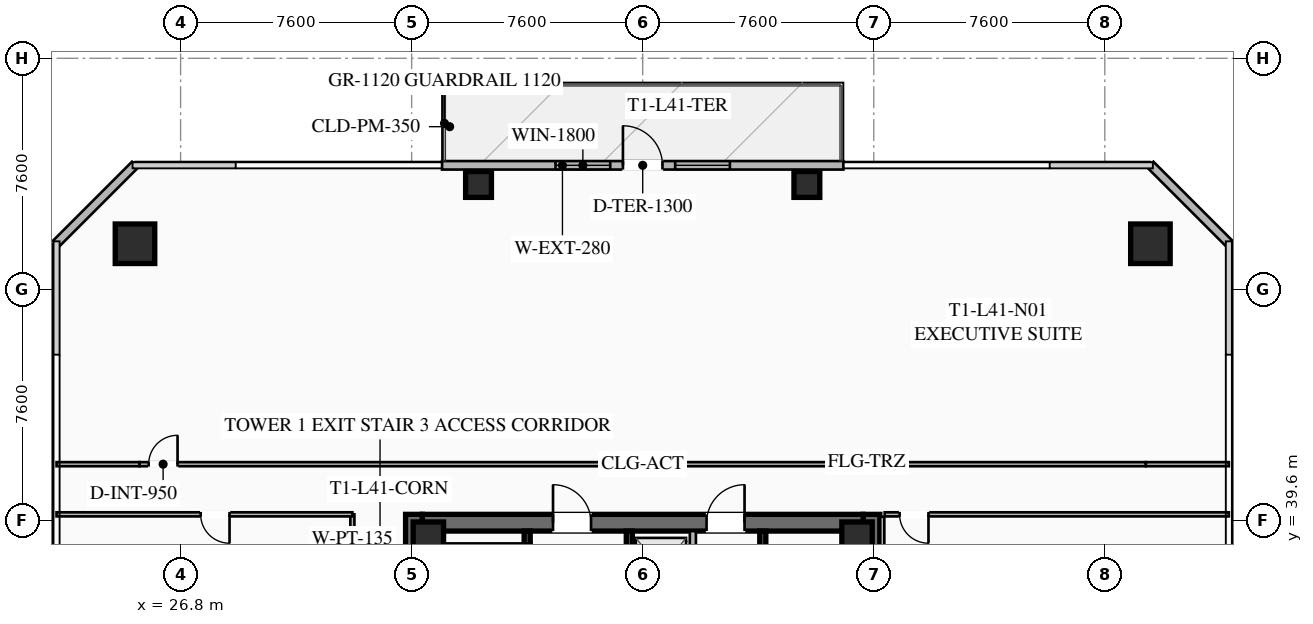
"""IFC4 building model, lengths in metres.
Left out: names, types, materials, properties, quantities, classifications, styles, units other than length and angle.
Written with IfcOpenShell. Run it as: python <this file> out.ifc"""

import sys

from ifc_helpers import new_model, si_unit, direction, frame, frame_2d, origin, origin_2d, place, context, subcontext, project, spatial, rectangle, hollow_rectangle, extrude, element, fill, save


model = new_model("IFC4")
c1 = context("Model", 3, precision=1e-05, world=origin(), true_north=direction((0.0, 1.0)))
c2 = subcontext(c1, "Body", "Model", "MODEL_VIEW")
j1 = project(units=[si_unit("LENGTHUNIT", "METRE"), si_unit("PLANEANGLEUNIT", "RADIAN")], contexts=[c1])
p1 = place(None, origin())
s1 = spatial("IfcSite", under=j1, at=p1, CompositionType="ELEMENT")
p2 = place(p1, origin())
s2 = spatial("IfcBuilding", under=s1, at=p2, CompositionType="ELEMENT")
p3 = place(p2, frame((0.0, 0.0, 153.45)))
s3 = spatial("IfcBuildingStorey", under=s2, at=p3, CompositionType="ELEMENT", Elevation=153.45)
for number, where, z_axis, x_axis in (
    (1, (34.475, 24.2, 0.0), (0.0, 0.0, 1.0), (0.0, 1.0, 0.0)),
    (2, (49.525, 39.8, 0.0), (0.0, 0.0, 1.0), (0.0, -1.0, 0.0)),
):
    element("IfcWall", number, at=place(p3, frame(where, z_axis=z_axis, x_axis=x_axis)), inside=s3, PredefinedType="SHEAR", context=c2, shape_type="SweptSolid", body=[
        extrude(rectangle(XDim=15.6, YDim=0.55, at=frame_2d((7.8, 0.0))), origin(), (0.0, 0.0, 1.0), 3.55),
    ])
p4 = place(p3, frame((34.75, 39.525, 0.0), z_axis=(0.0, 0.0, 1.0), x_axis=(1.0, 0.0, 0.0)))
e3 = element("IfcWall", 3, at=p4, inside=s3, PredefinedType="SHEAR", context=c2, shape_type="SweptSolid", body=[
    extrude(rectangle(XDim=14.5, YDim=0.55, at=frame_2d((7.25, 0.0))), origin(), (0.0, 0.0, 1.0), 3.55),
])
p5 = place(p4, frame((4.3, 0.0, 0.0)))
e4 = element("IfcOpeningElement", 4, at=p5, cuts=e3, PredefinedType="OPENING", context=c2, shape_type="SweptSolid", body=[
    extrude(rectangle(XDim=1.25, YDim=2.25, at=frame_2d((0.625, 1.125))), frame((0.0, 0.285, 0.0), z_axis=(0.0, -1.0, 0.0), x_axis=(1.0, 0.0, 0.0)), (0.0, 0.0, 1.0), 0.57),
])
p6 = place(p4, frame((9.35, 0.0, 0.0)))
e5 = element("IfcOpeningElement", 5, at=p6, cuts=e3, PredefinedType="OPENING", context=c2, shape_type="SweptSolid", body=[
    extrude(rectangle(XDim=1.25, YDim=2.25, at=frame_2d((0.625, 1.125))), frame((0.0, 0.285, 0.0), z_axis=(0.0, -1.0, 0.0), x_axis=(1.0, 0.0, 0.0)), (0.0, 0.0, 1.0), 0.57),
])
for number, where, z_axis, x_axis in (
    (6, (49.05, 39.05, 0.0), (0.0, 0.0, 1.0), (1.0, 0.0, 0.0)),
    (7, (34.95, 39.05, 0.0), (0.0, 0.0, 1.0), (1.0, 0.0, 0.0)),
):
    element("IfcColumn", number, at=place(p3, frame(where, z_axis=z_axis, x_axis=x_axis)), inside=s3, PredefinedType="COLUMN", context=c2, shape_type="SweptSolid", body=[
        extrude(hollow_rectangle(XDim=1.0, YDim=1.0, WallThickness=0.04, at=origin_2d()), origin(), (0.0, 0.0, 1.0), 3.37),
    ])
for number, where, z_axis, x_axis in (
    (8, (58.7, 48.7, 0.0), (0.0, 0.0, 1.0), (1.0, 0.0, 0.0)),
    (9, (25.3, 48.7, 0.0), (0.0, 0.0, 1.0), (1.0, 0.0, 0.0)),
):
    element("IfcColumn", number, at=place(p3, frame(where, z_axis=z_axis, x_axis=x_axis)), inside=s3, PredefinedType="COLUMN", context=c2, shape_type="SweptSolid", body=[
        extrude(hollow_rectangle(XDim=1.3, YDim=1.3, WallThickness=0.05, at=origin_2d()), origin(), (0.0, 0.0, 1.0), 3.37),
    ])
for number, where, z_axis, x_axis in (
    (10, (47.4, 50.65, 0.0), (0.0, 0.0, 1.0), (1.0, 0.0, 0.0)),
    (11, (36.6, 50.65, 0.0), (0.0, 0.0, 1.0), (1.0, 0.0, 0.0)),
):
    element("IfcColumn", number, at=place(p3, frame(where, z_axis=z_axis, x_axis=x_axis)), inside=s3, PredefinedType="COLUMN", context=c2, shape_type="SweptSolid", body=[
        extrude(hollow_rectangle(XDim=0.85, YDim=0.85, WallThickness=0.035, at=origin_2d()), origin(), (0.0, 0.0, 1.0), 3.37),
    ])
p7 = place(p3, frame((35.4, 51.28, 0.0), z_axis=(0.0, 0.0, 1.0), x_axis=(1.0, 0.0, 0.0)))
e12 = element("IfcWall", 12, at=p7, inside=s3, PredefinedType="SOLIDWALL", context=c2, shape_type="SweptSolid", body=[
    extrude(rectangle(XDim=13.2, YDim=0.28, at=frame_2d((6.6, 0.0))), origin(), (0.0, 0.0, 1.0), 3.37),
])
p8 = place(p7, frame((5.95, 0.0, 0.0)))
e13 = element("IfcOpeningElement", 13, at=p8, cuts=e12, PredefinedType="OPENING", context=c2, shape_type="SweptSolid", body=[
    extrude(rectangle(XDim=1.3, YDim=2.15, at=frame_2d((0.65, 1.075))), frame((0.0, 0.15, 0.0), z_axis=(0.0, -1.0, 0.0), x_axis=(1.0, 0.0, 0.0)), (0.0, 0.0, 1.0), 0.3),
])
p9 = place(p7, frame((3.732, 0.0, 0.85)))
e14 = element("IfcOpeningElement", 14, at=p9, cuts=e12, PredefinedType="OPENING", context=c2, shape_type="SweptSolid", body=[
    extrude(rectangle(XDim=1.8, YDim=1.92, at=frame_2d((0.9, 0.96))), frame((0.0, 0.15, 0.0), z_axis=(0.0, -1.0, 0.0), x_axis=(1.0, 0.0, 0.0)), (0.0, 0.0, 1.0), 0.3),
])
p10 = place(p7, frame((7.668, 0.0, 0.85)))
e15 = element("IfcOpeningElement", 15, at=p10, cuts=e12, PredefinedType="OPENING", context=c2, shape_type="SweptSolid", body=[
    extrude(rectangle(XDim=1.8, YDim=1.92, at=frame_2d((0.9, 0.96))), frame((0.0, 0.15, 0.0), z_axis=(0.0, -1.0, 0.0), x_axis=(1.0, 0.0, 0.0)), (0.0, 0.0, 1.0), 0.3),
])
for number, where, z_axis, x_axis in (
    (16, (22.7, 48.7, 0.0), (0.0, 0.0, 1.0), (0.707, 0.707, 0.0)),
    (17, (58.7, 51.3, 0.0), (0.0, 0.0, 1.0), (0.707, -0.707, 0.0)),
):
    element("IfcWall", number, at=place(p3, frame(where, z_axis=z_axis, x_axis=x_axis)), inside=s3, PredefinedType="SOLIDWALL", context=c2, shape_type="SweptSolid", body=[
        extrude(rectangle(XDim=3.677, YDim=0.28, at=frame_2d((1.838, 0.0))), origin(), (0.0, 0.0, 1.0), 3.37),
    ])
p11 = place(p3, frame((38.2, 31.2, 0.0), z_axis=(0.0, 0.0, 1.0), x_axis=(0.0, 1.0, 0.0)))
e18 = element("IfcWall", 18, at=p11, inside=s3, PredefinedType="SHEAR", context=c2, shape_type="SweptSolid", body=[
    extrude(rectangle(XDim=8.05, YDim=0.2, at=frame_2d((4.025, 0.0))), origin(), (0.0, 0.0, 1.0), 3.37),
])
p12 = place(p11, frame((0.45, 0.0, 0.0)))
e19 = element("IfcOpeningElement", 19, at=p12, cuts=e18, PredefinedType="OPENING", context=c2, shape_type="SweptSolid", body=[
    extrude(rectangle(XDim=1.15, YDim=2.2, at=frame_2d((0.575, 1.1))), frame((0.0, 0.11, 0.0), z_axis=(0.0, -1.0, 0.0), x_axis=(1.0, 0.0, 0.0)), (0.0, 0.0, 1.0), 0.22),
])
p13 = place(p3, frame((41.56, 24.75, 0.0), z_axis=(0.0, 0.0, 1.0), x_axis=(0.0, 1.0, 0.0)))
e20 = element("IfcWall", 20, at=p13, inside=s3, PredefinedType="SHEAR", context=c2, shape_type="SweptSolid", body=[
    extrude(rectangle(XDim=14.5, YDim=0.2, at=frame_2d((7.25, 0.0))), origin(), (0.0, 0.0, 1.0), 3.37),
])
p14 = place(p3, frame((45.95, 39.25, 0.0), z_axis=(0.0, 0.0, 1.0), x_axis=(0.0, -1.0, 0.0)))
e21 = element("IfcWall", 21, at=p14, inside=s3, PredefinedType="SHEAR", context=c2, shape_type="SweptSolid", body=[
    extrude(rectangle(XDim=6.45, YDim=0.2, at=frame_2d((3.225, 0.0))), origin(), (0.0, 0.0, 1.0), 3.37),
])
p15 = place(p3, frame((43.65, 32.35, 0.0), z_axis=(0.0, 0.0, 1.0), x_axis=(0.0, 1.0, 0.0)))
e22 = element("IfcWall", 22, at=p15, inside=s3, PredefinedType="SOLIDWALL", context=c2, shape_type="SweptSolid", body=[
    extrude(rectangle(XDim=6.9, YDim=0.2, at=frame_2d((3.45, 0.0))), origin(), (0.0, 0.0, 1.0), 3.37),
])
p16 = place(p15, frame((0.575, 0.0, 0.0)))
e23 = element("IfcOpeningElement", 23, at=p16, cuts=e22, PredefinedType="OPENING", context=c2, shape_type="SweptSolid", body=[
    extrude(rectangle(XDim=1.1, YDim=2.2, at=frame_2d((0.55, 1.1))), frame((0.0, 0.11, 0.0), z_axis=(0.0, -1.0, 0.0), x_axis=(1.0, 0.0, 0.0)), (0.0, 0.0, 1.0), 0.22),
])
p17 = place(p15, frame((2.825, 0.0, 0.0)))
e24 = element("IfcOpeningElement", 24, at=p17, cuts=e22, PredefinedType="OPENING", context=c2, shape_type="SweptSolid", body=[
    extrude(rectangle(XDim=1.1, YDim=2.2, at=frame_2d((0.55, 1.1))), frame((0.0, 0.11, 0.0), z_axis=(0.0, -1.0, 0.0), x_axis=(1.0, 0.0, 0.0)), (0.0, 0.0, 1.0), 0.22),
])
p18 = place(p15, frame((5.075, 0.0, 0.0)))
e25 = element("IfcOpeningElement", 25, at=p18, cuts=e22, PredefinedType="OPENING", context=c2, shape_type="SweptSolid", body=[
    extrude(rectangle(XDim=1.1, YDim=2.2, at=frame_2d((0.55, 1.1))), frame((0.0, 0.11, 0.0), z_axis=(0.0, -1.0, 0.0), x_axis=(1.0, 0.0, 0.0)), (0.0, 0.0, 1.0), 0.22),
])
p19 = place(p3, frame((32.45, 35.4, 0.0), z_axis=(0.0, 0.0, 1.0), x_axis=(0.0, 1.0, 0.0)))
e26 = element("IfcWall", 26, at=p19, inside=s3, PredefinedType="PARTITIONING", context=c2, shape_type="SweptSolid", body=[
    extrude(rectangle(XDim=4.4, YDim=0.135, at=frame_2d((2.2, 0.0))), origin(), (0.0, 0.0, 1.0), 2.513),
])
p20 = place(p3, frame((25.45, 41.45, 0.0), z_axis=(0.0, 0.0, 1.0), x_axis=(1.0, 0.0, 0.0)))
e27 = element("IfcWall", 27, at=p20, inside=s3, PredefinedType="PARTITIONING", context=c2, shape_type="SweptSolid", body=[
    extrude(rectangle(XDim=33.1, YDim=0.135, at=frame_2d((16.55, 0.0))), origin(), (0.0, 0.0, 1.0), 2.513),
])
p21 = place(p20, frame((0.3, 0.0, 0.0)))
e28 = element("IfcOpeningElement", 28, at=p21, cuts=e27, PredefinedType="OPENING", context=c2, shape_type="SweptSolid", body=[
    extrude(rectangle(XDim=0.95, YDim=2.05, at=frame_2d((0.475, 1.025))), frame((0.0, 0.077, 0.0), z_axis=(0.0, -1.0, 0.0), x_axis=(1.0, 0.0, 0.0)), (0.0, 0.0, 1.0), 0.155),
])
for number, where, z_axis, x_axis in (
    (29, (22.72, 41.45, 0.0), (0.0, 0.0, 1.0), (1.0, 0.0, 0.0)),
    (30, (58.55, 41.45, 0.0), (0.0, 0.0, 1.0), (1.0, 0.0, 0.0)),
):
    element("IfcWall", number, at=place(p3, frame(where, z_axis=z_axis, x_axis=x_axis)), inside=s3, PredefinedType="PARTITIONING", context=c2, shape_type="SweptSolid", body=[
        extrude(rectangle(XDim=2.73, YDim=0.135, at=frame_2d((1.365, 0.0))), origin(), (0.0, 0.0, 1.0), 2.513),
    ])
p22 = place(p3, frame((49.88, 39.72, 0.0), z_axis=(0.0, 0.0, 1.0), x_axis=(0.0, -1.0, 0.0)))
e31 = element("IfcWall", 31, at=p22, inside=s3, PredefinedType="PARTITIONING", context=c2, shape_type="SweptSolid", body=[
    extrude(rectangle(XDim=15.44, YDim=0.135, at=frame_2d((7.72, 0.0))), origin(), (0.0, 0.0, 1.0), 2.513),
])
p23 = place(p3, frame((61.28, 39.8, 0.0), z_axis=(0.0, 0.0, 1.0), x_axis=(-1.0, 0.0, 0.0)))
e32 = element("IfcWall", 32, at=p23, inside=s3, PredefinedType="PARTITIONING", context=c2, shape_type="SweptSolid", body=[
    extrude(rectangle(XDim=11.32, YDim=0.135, at=frame_2d((5.66, 0.0))), origin(), (0.0, 0.0, 1.0), 2.513),
])
p24 = place(p23, frame((9.88, 0.0, 0.0)))
e33 = element("IfcOpeningElement", 33, at=p24, cuts=e32, PredefinedType="OPENING", context=c2, shape_type="SweptSolid", body=[
    extrude(rectangle(XDim=0.95, YDim=2.05, at=frame_2d((0.475, 1.025))), frame((0.0, 0.077, 0.0), z_axis=(0.0, -1.0, 0.0), x_axis=(1.0, 0.0, 0.0)), (0.0, 0.0, 1.0), 0.155),
])
p25 = place(p3, frame((32.45, 39.8, 0.0), z_axis=(0.0, 0.0, 1.0), x_axis=(-1.0, 0.0, 0.0)))
e34 = element("IfcWall", 34, at=p25, inside=s3, PredefinedType="PARTITIONING", context=c2, shape_type="SweptSolid", body=[
    extrude(rectangle(XDim=9.73, YDim=0.135, at=frame_2d((4.865, 0.0))), origin(), (0.0, 0.0, 1.0), 2.513),
])
p26 = place(p25, frame((4.04, 0.0, 0.0)))
e35 = element("IfcOpeningElement", 35, at=p26, cuts=e34, PredefinedType="OPENING", context=c2, shape_type="SweptSolid", body=[
    extrude(rectangle(XDim=0.95, YDim=2.05, at=frame_2d((0.475, 1.025))), frame((0.0, 0.077, 0.0), z_axis=(0.0, -1.0, 0.0), x_axis=(1.0, 0.0, 0.0)), (0.0, 0.0, 1.0), 0.155),
])
p27 = place(p8, origin())
e36 = element("IfcDoor", 36, at=p27, inside=s3, OperationType="SINGLE_SWING_LEFT", PredefinedType="DOOR", context=c2, shape_type="SweptSolid", body=[
    extrude(rectangle(XDim=1.3, YDim=2.15, at=frame_2d((0.65, 1.075))), frame((0.0, 0.025, 0.0), z_axis=(0.0, -1.0, 0.0), x_axis=(1.0, 0.0, 0.0)), (0.0, 0.0, 1.0), 0.05),
])
fill(e13, e36)
p28 = place(p9, origin())
e37 = element("IfcWindow", 37, at=p28, inside=s3, PartitioningType="SINGLE_PANEL", PredefinedType="WINDOW", context=c2, shape_type="SweptSolid", body=[
    extrude(rectangle(XDim=1.8, YDim=1.92, at=frame_2d((0.9, 0.96))), frame((0.0, 0.03, 0.0), z_axis=(0.0, -1.0, 0.0), x_axis=(1.0, 0.0, 0.0)), (0.0, 0.0, 1.0), 0.06),
])
fill(e14, e37)
p29 = place(p10, origin())
e38 = element("IfcWindow", 38, at=p29, inside=s3, PartitioningType="SINGLE_PANEL", PredefinedType="WINDOW", context=c2, shape_type="SweptSolid", body=[
    extrude(rectangle(XDim=1.8, YDim=1.92, at=frame_2d((0.9, 0.96))), frame((0.0, 0.03, 0.0), z_axis=(0.0, -1.0, 0.0), x_axis=(1.0, 0.0, 0.0)), (0.0, 0.0, 1.0), 0.06),
])
fill(e15, e38)
p30 = place(p5, origin())
e39 = element("IfcDoor", 39, at=p30, inside=s3, OperationType="SINGLE_SWING_LEFT", PredefinedType="DOOR", context=c2, shape_type="SweptSolid", body=[
    extrude(rectangle(XDim=1.25, YDim=2.25, at=frame_2d((0.625, 1.125))), frame((0.0, 0.025, 0.0), z_axis=(0.0, -1.0, 0.0), x_axis=(1.0, 0.0, 0.0)), (0.0, 0.0, 1.0), 0.05),
])
fill(e4, e39)
p31 = place(p6, origin())
e40 = element("IfcDoor", 40, at=p31, inside=s3, OperationType="SINGLE_SWING_RIGHT", PredefinedType="DOOR", context=c2, shape_type="SweptSolid", body=[
    extrude(rectangle(XDim=1.25, YDim=2.25, at=frame_2d((0.625, 1.125))), frame((0.0, 0.025, 0.0), z_axis=(0.0, -1.0, 0.0), x_axis=(1.0, 0.0, 0.0)), (0.0, 0.0, 1.0), 0.05),
])
fill(e5, e40)
p32 = place(p21, origin())
e41 = element("IfcDoor", 41, at=p32, inside=s3, OperationType="SINGLE_SWING_RIGHT", PredefinedType="DOOR", context=c2, shape_type="SweptSolid", body=[
    extrude(rectangle(XDim=0.95, YDim=2.05, at=frame_2d((0.475, 1.025))), frame((0.0, 0.025, 0.0), z_axis=(0.0, -1.0, 0.0), x_axis=(1.0, 0.0, 0.0)), (0.0, 0.0, 1.0), 0.05),
])
fill(e28, e41)
p33 = place(p24, origin())
e42 = element("IfcDoor", 42, at=p33, inside=s3, OperationType="SINGLE_SWING_LEFT", PredefinedType="DOOR", context=c2, shape_type="SweptSolid", body=[
    extrude(rectangle(XDim=0.95, YDim=2.05, at=frame_2d((0.475, 1.025))), frame((0.0, 0.025, 0.0), z_axis=(0.0, -1.0, 0.0), x_axis=(1.0, 0.0, 0.0)), (0.0, 0.0, 1.0), 0.05),
])
fill(e33, e42)
p34 = place(p26, origin())
e43 = element("IfcDoor", 43, at=p34, inside=s3, OperationType="SINGLE_SWING_LEFT", PredefinedType="DOOR", context=c2, shape_type="SweptSolid", body=[
    extrude(rectangle(XDim=0.95, YDim=2.05, at=frame_2d((0.475, 1.025))), frame((0.0, 0.025, 0.0), z_axis=(0.0, -1.0, 0.0), x_axis=(1.0, 0.0, 0.0)), (0.0, 0.0, 1.0), 0.05),
])
fill(e35, e43)
save(model, sys.argv[1])
